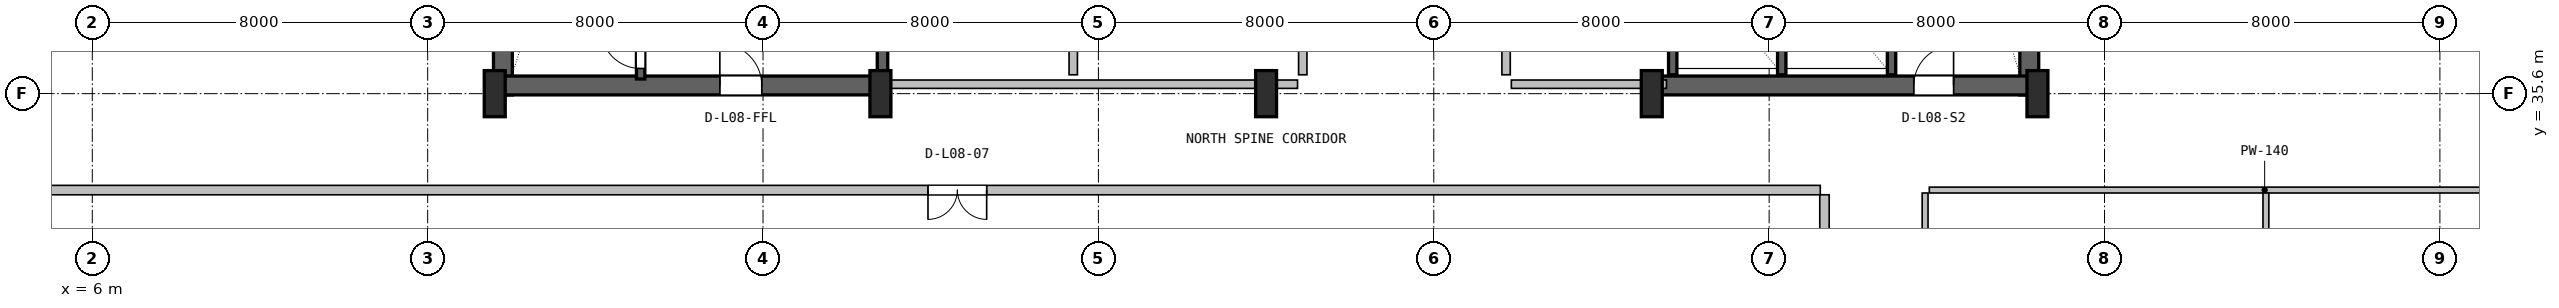
"""IFC4 building model, lengths in metres.
Left out: names, types, materials, properties, quantities, classifications, styles, units other than length and angle.
Written with IfcOpenShell. Run it as: python <this file> out.ifc"""

import sys

from ifc_helpers import new_model, si_unit, direction, frame, frame_2d, origin, origin_2d, place, context, subcontext, project, spatial, rectangle, i_section, extrude, source, transform, mapped, element, fill, save


model = new_model("IFC4")
c1 = context("Model", 3, precision=1e-05, world=origin(), true_north=direction((0.0, 1.0)))
c2 = subcontext(c1, "Body", "Model", "MODEL_VIEW")
j1 = project(units=[si_unit("LENGTHUNIT", "METRE"), si_unit("PLANEANGLEUNIT", "RADIAN")], contexts=[c1])
p1 = place(None, origin())
s1 = spatial("IfcSite", under=j1, at=p1, CompositionType="ELEMENT")
p2 = place(p1, origin())
s2 = spatial("IfcBuilding", under=s1, at=p2, CompositionType="ELEMENT")
p3 = place(p2, frame((0.0, 0.0, 39.3)))
s3 = spatial("IfcBuildingStorey", under=s2, at=p3, CompositionType="ELEMENT", Elevation=39.3)
for number, where, z_axis, x_axis in (
    (1, (15.795, 35.57, 0.0), (0.0, 0.0, 1.0), (0.0, 1.0, 0.0)),
    (2, (52.205, 35.57, 0.0), (0.0, 0.0, 1.0), (0.0, 1.0, 0.0)),
):
    element("IfcWall", number, at=place(p3, frame(where, z_axis=z_axis, x_axis=x_axis)), inside=s3, PredefinedType="SHEAR", context=c2, shape_type="SweptSolid", body=[
        extrude(rectangle(XDim=11.23, YDim=0.45, at=frame_2d((5.615, 0.0))), origin(), (0.0, 0.0, 1.0), 3.65),
    ])
p4 = place(p3, frame((15.57, 35.795, 0.0), z_axis=(0.0, 0.0, 1.0), x_axis=(1.0, 0.0, 0.0)))
e3 = element("IfcWall", 3, at=p4, inside=s3, PredefinedType="SHEAR", context=c2, shape_type="SweptSolid", body=[
    extrude(rectangle(XDim=9.23, YDim=0.45, at=frame_2d((4.615, 0.0))), origin(), (0.0, 0.0, 1.0), 3.65),
])
p5 = place(p4, frame((5.4, 0.0, 0.0)))
e4 = element("IfcOpeningElement", 4, at=p5, cuts=e3, PredefinedType="OPENING", context=c2, shape_type="SweptSolid", body=[
    extrude(rectangle(XDim=1.0, YDim=2.1, at=frame_2d((0.5, 1.05))), frame((0.0, 0.235, 0.0), z_axis=(0.0, -1.0, 0.0), x_axis=(1.0, 0.0, 0.0)), (0.0, 0.0, 1.0), 0.47),
])
p6 = place(p3, frame((43.2, 35.795, 0.0), z_axis=(0.0, 0.0, 1.0), x_axis=(1.0, 0.0, 0.0)))
e5 = element("IfcWall", 5, at=p6, inside=s3, PredefinedType="SHEAR", context=c2, shape_type="SweptSolid", body=[
    extrude(rectangle(XDim=9.23, YDim=0.45, at=frame_2d((4.615, 0.0))), origin(), (0.0, 0.0, 1.0), 3.65),
])
p7 = place(p6, frame((6.25, 0.0, 0.0)))
e6 = element("IfcOpeningElement", 6, at=p7, cuts=e5, PredefinedType="OPENING", context=c2, shape_type="SweptSolid", body=[
    extrude(rectangle(XDim=0.95, YDim=2.1, at=frame_2d((0.475, 1.05))), frame((0.0, 0.235, 0.0), z_axis=(0.0, -1.0, 0.0), x_axis=(1.0, 0.0, 0.0)), (0.0, 0.0, 1.0), 0.47),
])
m1 = source(origin(), c2, "Body", "SweptSolid", [
    extrude(i_section(OverallWidth=0.5, OverallDepth=1.1, WebThickness=0.018, FlangeThickness=0.032, FilletRadius=0.018, at=origin_2d()), origin(), (0.0, 0.0, 1.0), 3.9),
])
for number, where, z_axis, x_axis in (
    (7, (15.6, 35.6, 0.0), (0.0, 0.0, 1.0), (1.0, 0.0, 0.0)),
    (8, (24.8, 35.6, 0.0), (0.0, 0.0, 1.0), (1.0, 0.0, 0.0)),
    (9, (34.0, 35.6, 0.0), (0.0, 0.0, 1.0), (1.0, 0.0, 0.0)),
    (10, (43.2, 35.6, 0.0), (0.0, 0.0, 1.0), (1.0, 0.0, 0.0)),
    (11, (52.4, 35.6, 0.0), (0.0, 0.0, 1.0), (1.0, 0.0, 0.0)),
):
    element("IfcColumn", number, at=place(p3, frame(where, z_axis=z_axis, x_axis=x_axis)), inside=s3, PredefinedType="COLUMN", context=c2, shape_type="MappedRepresentation", body=[
        mapped(m1, transform((0.0, 0.0, 0.0), x_axis=(1.0, 0.0, 0.0), y_axis=(0.0, 1.0, 0.0), z_axis=(0.0, 0.0, 1.0), scale=1.0)),
    ])
p8 = place(p3, frame((19.08, 35.95, 0.0), z_axis=(0.0, 0.0, 1.0), x_axis=(0.0, 1.0, 0.0)))
e12 = element("IfcWall", 12, at=p8, inside=s3, PredefinedType="SHEAR", context=c2, shape_type="SweptSolid", body=[
    extrude(rectangle(XDim=9.65, YDim=0.2, at=frame_2d((4.825, 0.0))), origin(), (0.0, 0.0, 1.0), 3.65),
])
p9 = place(p8, frame((0.25, 0.0, 0.0)))
e13 = element("IfcOpeningElement", 13, at=p9, cuts=e12, PredefinedType="OPENING", context=c2, shape_type="SweptSolid", body=[
    extrude(rectangle(XDim=0.95, YDim=2.1, at=frame_2d((0.475, 1.05))), frame((0.0, 0.11, 0.0), z_axis=(0.0, -1.0, 0.0), x_axis=(1.0, 0.0, 0.0)), (0.0, 0.0, 1.0), 0.22),
])
p10 = place(p3, frame((24.85, 36.05, 0.0), z_axis=(0.0, 0.0, 1.0), x_axis=(0.0, 1.0, 0.0)))
e14 = element("IfcWall", 14, at=p10, inside=s3, PredefinedType="SHEAR", context=c2, shape_type="SweptSolid", body=[
    extrude(rectangle(XDim=10.45, YDim=0.25, at=frame_2d((5.225, 0.0))), origin(), (0.0, 0.0, 1.0), 3.65),
])
p11 = place(p3, frame((48.92, 36.05, 0.0), z_axis=(0.0, 0.0, 1.0), x_axis=(0.0, 1.0, 0.0)))
e15 = element("IfcWall", 15, at=p11, inside=s3, PredefinedType="SHEAR", context=c2, shape_type="SweptSolid", body=[
    extrude(rectangle(XDim=10.5, YDim=0.2, at=frame_2d((5.25, 0.0))), origin(), (0.0, 0.0, 1.0), 3.65),
])
for number, where, z_axis, x_axis in (
    (16, (43.7, 36.05, 0.0), (0.0, 0.0, 1.0), (0.0, 1.0, 0.0)),
    (17, (46.3, 36.05, 0.0), (0.0, 0.0, 1.0), (0.0, 1.0, 0.0)),
):
    element("IfcWall", number, at=place(p3, frame(where, z_axis=z_axis, x_axis=x_axis)), inside=s3, PredefinedType="SHEAR", context=c2, shape_type="SweptSolid", body=[
        extrude(rectangle(XDim=3.05, YDim=0.2, at=frame_2d((1.525, 0.0))), origin(), (0.0, 0.0, 1.0), 3.65),
    ])
p12 = place(p3, frame((25.0, 35.825, 0.0), z_axis=(0.0, 0.0, 1.0), x_axis=(1.0, 0.0, 0.0)))
e18 = element("IfcWall", 18, at=p12, inside=s3, PredefinedType="PLUMBINGWALL", context=c2, shape_type="SweptSolid", body=[
    extrude(rectangle(XDim=9.75, YDim=0.2, at=frame_2d((4.875, 0.0))), origin(), (0.0, 0.0, 1.0), 2.425),
])
for number, where, z_axis, x_axis in (
    (19, (29.4, 36.05, 0.0), (0.0, 0.0, 1.0), (0.0, 1.0, 0.0)),
    (20, (34.875, 36.05, 0.0), (0.0, 0.0, 1.0), (0.0, 1.0, 0.0)),
):
    element("IfcWall", number, at=place(p3, frame(where, z_axis=z_axis, x_axis=x_axis)), inside=s3, PredefinedType="PLUMBINGWALL", context=c2, shape_type="SweptSolid", body=[
        extrude(rectangle(XDim=3.1, YDim=0.2, at=frame_2d((1.55, 0.0))), origin(), (0.0, 0.0, 1.0), 3.63),
    ])
p13 = place(p3, frame((39.85, 35.825, 0.0), z_axis=(0.0, 0.0, 1.0), x_axis=(1.0, 0.0, 0.0)))
e21 = element("IfcWall", 21, at=p13, inside=s3, PredefinedType="SOLIDWALL", context=c2, shape_type="SweptSolid", body=[
    extrude(rectangle(XDim=3.7, YDim=0.2, at=frame_2d((1.85, 0.0))), origin(), (0.0, 0.0, 1.0), 2.425),
])
p14 = place(p3, frame((39.725, 36.05, 0.0), z_axis=(0.0, 0.0, 1.0), x_axis=(0.0, 1.0, 0.0)))
e22 = element("IfcWall", 22, at=p14, inside=s3, PredefinedType="SOLIDWALL", context=c2, shape_type="SweptSolid", body=[
    extrude(rectangle(XDim=3.1, YDim=0.2, at=frame_2d((1.55, 0.0))), origin(), (0.0, 0.0, 1.0), 3.63),
])
p15 = place(p3, frame((47.32, 13.203, 0.0), z_axis=(0.0, 0.0, 1.0), x_axis=(0.0, 1.0, 0.0)))
e23 = element("IfcWall", 23, at=p15, inside=s3, PredefinedType="PARTITIONING", context=c2, shape_type="SweptSolid", body=[
    extrude(rectangle(XDim=19.985, YDim=0.225, at=frame_2d((9.993, 0.0))), origin(), (0.0, 0.0, 1.0), 3.322),
])
p16 = place(p3, frame((2.18, 33.3, 0.0), z_axis=(0.0, 0.0, 1.0), x_axis=(1.0, 0.0, 0.0)))
e24 = element("IfcWall", 24, at=p16, inside=s3, PredefinedType="PARTITIONING", context=c2, shape_type="SweptSolid", body=[
    extrude(rectangle(XDim=45.04, YDim=0.225, at=frame_2d((22.52, 0.0))), origin(), (0.0, 0.0, 1.0), 2.852),
])
p17 = place(p16, frame((23.755, 0.0, 0.0)))
e25 = element("IfcOpeningElement", 25, at=p17, cuts=e24, PredefinedType="OPENING", context=c2, shape_type="SweptSolid", body=[
    extrude(rectangle(XDim=1.4, YDim=2.12, at=frame_2d((0.7, 1.06))), frame((0.0, 0.123, 0.0), z_axis=(0.0, -1.0, 0.0), x_axis=(1.0, 0.0, 0.0)), (0.0, 0.0, 1.0), 0.245),
])
p18 = place(p3, frame((49.82, 33.3, 0.0), z_axis=(0.0, 0.0, 1.0), x_axis=(1.0, 0.0, 0.0)))
e26 = element("IfcWall", 26, at=p18, inside=s3, PredefinedType="PARTITIONING", context=c2, shape_type="SweptSolid", body=[
    extrude(rectangle(XDim=16.0, YDim=0.14, at=frame_2d((8.0, 0.0))), origin(), (0.0, 0.0, 1.0), 3.208),
])
p19 = place(p3, frame((57.85, 12.2, 0.0), z_axis=(0.0, 0.0, 1.0), x_axis=(0.0, 1.0, 0.0)))
e27 = element("IfcWall", 27, at=p19, inside=s3, PredefinedType="PARTITIONING", context=c2, shape_type="SweptSolid", body=[
    extrude(rectangle(XDim=21.03, YDim=0.14, at=frame_2d((10.515, 0.0))), origin(), (0.0, 0.0, 1.0), 3.322),
])
p20 = place(p3, frame((49.72, 1.38, 0.0), z_axis=(0.0, 0.0, 1.0), x_axis=(0.0, 1.0, 0.0)))
e28 = element("IfcWall", 28, at=p20, inside=s3, PredefinedType="PARTITIONING", context=c2, shape_type="SweptSolid", body=[
    extrude(rectangle(XDim=31.85, YDim=0.14, at=frame_2d((15.925, 0.0))), origin(), (0.0, 0.0, 1.0), 3.208),
])
p21 = place(p20, frame((5.405, 0.0, 0.0)))
e29 = element("IfcOpeningElement", 29, at=p21, cuts=e28, PredefinedType="OPENING", context=c2, shape_type="SweptSolid", body=[
    extrude(rectangle(XDim=1.0, YDim=2.1, at=frame_2d((0.5, 1.05))), frame((0.0, 0.08, 0.0), z_axis=(0.0, -1.0, 0.0), x_axis=(1.0, 0.0, 0.0)), (0.0, 0.0, 1.0), 0.16),
])
p22 = place(p20, frame((20.685, 0.0, 0.0)))
e30 = element("IfcOpeningElement", 30, at=p22, cuts=e28, PredefinedType="OPENING", context=c2, shape_type="SweptSolid", body=[
    extrude(rectangle(XDim=1.4, YDim=2.12, at=frame_2d((0.7, 1.06))), frame((0.0, 0.08, 0.0), z_axis=(0.0, -1.0, 0.0), x_axis=(1.0, 0.0, 0.0)), (0.0, 0.0, 1.0), 0.16),
])
m2 = source(origin(), c2, "Body", "SweptSolid", [
    extrude(rectangle(XDim=0.95, YDim=2.1, at=frame_2d((0.475, 1.05))), frame((0.0, 0.025, 0.0), z_axis=(0.0, -1.0, 0.0), x_axis=(1.0, 0.0, 0.0)), (0.0, 0.0, 1.0), 0.05),
])
p23 = place(p9, origin())
e31 = element("IfcDoor", 31, at=p23, inside=s3, OperationType="SINGLE_SWING_RIGHT", PredefinedType="DOOR", context=c2, shape_type="MappedRepresentation", body=[
    mapped(m2, transform((0.0, 0.0, 0.0), x_axis=(1.0, 0.0, 0.0), y_axis=(0.0, 1.0, 0.0), z_axis=(0.0, 0.0, 1.0), scale=1.0)),
])
fill(e13, e31)
m3 = source(origin(), c2, "Body", "SweptSolid", [
    extrude(rectangle(XDim=1.0, YDim=2.1, at=frame_2d((0.5, 1.05))), frame((0.0, 0.025, 0.0), z_axis=(0.0, -1.0, 0.0), x_axis=(1.0, 0.0, 0.0)), (0.0, 0.0, 1.0), 0.05),
])
p24 = place(p5, origin())
e32 = element("IfcDoor", 32, at=p24, inside=s3, OperationType="SINGLE_SWING_LEFT", PredefinedType="DOOR", context=c2, shape_type="MappedRepresentation", body=[
    mapped(m3, transform((0.0, 0.0, 0.0), x_axis=(1.0, 0.0, 0.0), y_axis=(0.0, 1.0, 0.0), z_axis=(0.0, 0.0, 1.0), scale=1.0)),
])
fill(e4, e32)
p25 = place(p7, origin())
e33 = element("IfcDoor", 33, at=p25, inside=s3, OperationType="SINGLE_SWING_RIGHT", PredefinedType="DOOR", context=c2, shape_type="MappedRepresentation", body=[
    mapped(m2, transform((0.0, 0.0, 0.0), x_axis=(1.0, 0.0, 0.0), y_axis=(0.0, 1.0, 0.0), z_axis=(0.0, 0.0, 1.0), scale=1.0)),
])
fill(e6, e33)
m4 = source(origin(), c2, "Body", "SweptSolid", [
    extrude(rectangle(XDim=1.4, YDim=2.12, at=frame_2d((0.7, 1.06))), frame((0.0, 0.025, 0.0), z_axis=(0.0, -1.0, 0.0), x_axis=(1.0, 0.0, 0.0)), (0.0, 0.0, 1.0), 0.05),
])
p26 = place(p17, frame((1.4, 0.0, 0.0), z_axis=(0.0, 0.0, 1.0), x_axis=(-1.0, 0.0, 0.0)))
e34 = element("IfcDoor", 34, at=p26, inside=s3, OperationType="DOUBLE_DOOR_SINGLE_SWING", PredefinedType="DOOR", context=c2, shape_type="MappedRepresentation", body=[
    mapped(m4, transform((0.0, 0.0, 0.0), x_axis=(1.0, 0.0, 0.0), y_axis=(0.0, 1.0, 0.0), z_axis=(0.0, 0.0, 1.0), scale=1.0)),
])
fill(e25, e34)
save(model, sys.argv[1])
